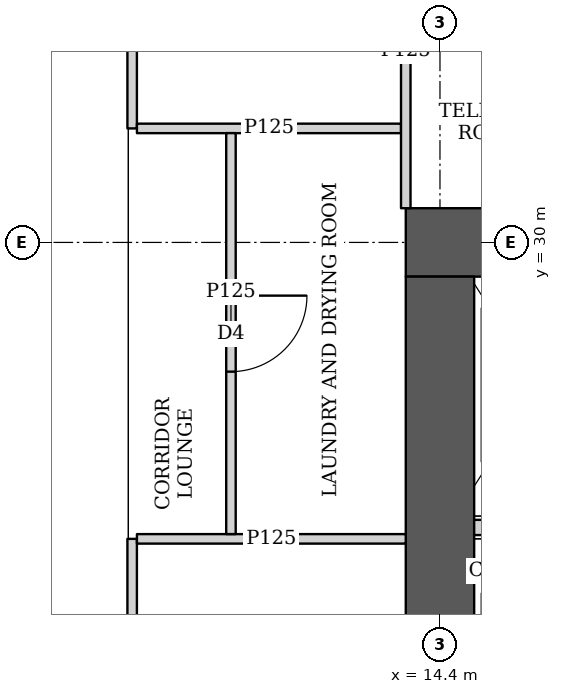
"""IFC4 building model, lengths in metres.
Left out: names, types, materials, properties, quantities, classifications, styles, units other than length and angle.
Written with IfcOpenShell. Run it as: python <this file> out.ifc"""

import sys

from ifc_helpers import new_model, si_unit, direction, frame, frame_2d, origin, place, context, subcontext, project, spatial, rectangle, extrude, element, fill, save


model = new_model("IFC4")
c1 = context("Model", 3, precision=1e-05, world=origin(), true_north=direction((0.0, 1.0)))
c2 = subcontext(c1, "Body", "Model", "MODEL_VIEW")
j1 = project(units=[si_unit("LENGTHUNIT", "METRE"), si_unit("PLANEANGLEUNIT", "RADIAN")], contexts=[c1])
p1 = place(None, origin())
s1 = spatial("IfcSite", under=j1, at=p1, CompositionType="ELEMENT")
p2 = place(p1, origin())
s2 = spatial("IfcBuilding", under=s1, at=p2, CompositionType="ELEMENT")
p3 = place(p2, frame((0.0, 0.0, 20.0)))
s3 = spatial("IfcBuildingStorey", under=s2, at=p3, CompositionType="ELEMENT", Elevation=20.0)
p4 = place(p3, frame((13.95, 30.0, 0.0), z_axis=(0.0, 0.0, 1.0), x_axis=(1.0, 0.0, 0.0)))
e1 = element("IfcWall", 1, at=p4, inside=s3, PredefinedType="SHEAR", context=c2, shape_type="SweptSolid", body=[
    extrude(rectangle(XDim=15.3, YDim=0.9, at=frame_2d((7.65, 0.0))), origin(), (0.0, 0.0, 1.0), 3.75),
])
p5 = place(p4, frame((4.45, 0.0, 0.0)))
e2 = element("IfcOpeningElement", 2, at=p5, cuts=e1, PredefinedType="OPENING", context=c2, shape_type="SweptSolid", body=[
    extrude(rectangle(XDim=1.8, YDim=2.1, at=frame_2d((0.9, 1.05))), frame((0.0, 0.46, 0.0), z_axis=(0.0, -1.0, 0.0), x_axis=(1.0, 0.0, 0.0)), (0.0, 0.0, 1.0), 0.92),
])
p6 = place(p4, frame((10.7, 0.0, 0.0)))
e3 = element("IfcOpeningElement", 3, at=p6, cuts=e1, PredefinedType="OPENING", context=c2, shape_type="SweptSolid", body=[
    extrude(rectangle(XDim=1.1, YDim=2.1, at=frame_2d((0.55, 1.05))), frame((0.0, 0.46, 0.0), z_axis=(0.0, -1.0, 0.0), x_axis=(1.0, 0.0, 0.0)), (0.0, 0.0, 1.0), 0.92),
])
p7 = place(p3, frame((14.4, 15.45, 0.0), z_axis=(0.0, 0.0, 1.0), x_axis=(0.0, 1.0, 0.0)))
e4 = element("IfcWall", 4, at=p7, inside=s3, PredefinedType="SHEAR", context=c2, shape_type="SweptSolid", body=[
    extrude(rectangle(XDim=14.1, YDim=0.9, at=frame_2d((7.05, 0.0))), origin(), (0.0, 0.0, 1.0), 3.75),
])
p8 = place(p3, frame((10.35, 10.3, 0.0), z_axis=(0.0, 0.0, 1.0), x_axis=(0.0, 1.0, 0.0)))
e5 = element("IfcWall", 5, at=p8, inside=s3, PredefinedType="PARTITIONING", context=c2, shape_type="SweptSolid", body=[
    extrude(rectangle(XDim=15.8, YDim=0.125, at=frame_2d((7.9, 0.0))), origin(), (0.0, 0.0, 1.0), 3.5),
])
p9 = place(p8, frame((1.55, 0.0, 0.0)))
e6 = element("IfcOpeningElement", 6, at=p9, cuts=e5, PredefinedType="OPENING", context=c2, shape_type="SweptSolid", body=[
    extrude(rectangle(XDim=1.0, YDim=2.1, at=frame_2d((0.5, 1.05))), frame((0.0, 0.073, 0.0), z_axis=(0.0, -1.0, 0.0), x_axis=(1.0, 0.0, 0.0)), (0.0, 0.0, 1.0), 0.145),
])
p10 = place(p8, frame((5.7, 0.0, 0.0)))
e7 = element("IfcOpeningElement", 7, at=p10, cuts=e5, PredefinedType="OPENING", context=c2, shape_type="SweptSolid", body=[
    extrude(rectangle(XDim=1.0, YDim=2.1, at=frame_2d((0.5, 1.05))), frame((0.0, 0.073, 0.0), z_axis=(0.0, -1.0, 0.0), x_axis=(1.0, 0.0, 0.0)), (0.0, 0.0, 1.0), 0.145),
])
p11 = place(p8, frame((11.55, 0.0, 0.0)))
e8 = element("IfcOpeningElement", 8, at=p11, cuts=e5, PredefinedType="OPENING", context=c2, shape_type="SweptSolid", body=[
    extrude(rectangle(XDim=1.0, YDim=2.1, at=frame_2d((0.5, 1.05))), frame((0.0, 0.073, 0.0), z_axis=(0.0, -1.0, 0.0), x_axis=(1.0, 0.0, 0.0)), (0.0, 0.0, 1.0), 0.145),
])
p12 = place(p3, frame((10.35, 31.5, 0.0), z_axis=(0.0, 0.0, 1.0), x_axis=(0.0, 1.0, 0.0)))
e9 = element("IfcWall", 9, at=p12, inside=s3, PredefinedType="PARTITIONING", context=c2, shape_type="SweptSolid", body=[
    extrude(rectangle(XDim=3.2, YDim=0.125, at=frame_2d((1.6, 0.0))), origin(), (0.0, 0.0, 1.0), 3.5),
])
p13 = place(p12, frame((1.1, 0.0, 0.0)))
e10 = element("IfcOpeningElement", 10, at=p13, cuts=e9, PredefinedType="OPENING", context=c2, shape_type="SweptSolid", body=[
    extrude(rectangle(XDim=1.0, YDim=2.1, at=frame_2d((0.5, 1.05))), frame((0.0, 0.073, 0.0), z_axis=(0.0, -1.0, 0.0), x_axis=(1.0, 0.0, 0.0)), (0.0, 0.0, 1.0), 0.145),
])
p14 = place(p3, frame((11.65, 26.163, 0.0), z_axis=(0.0, 0.0, 1.0), x_axis=(0.0, 1.0, 0.0)))
e11 = element("IfcWall", 11, at=p14, inside=s3, PredefinedType="PARTITIONING", context=c2, shape_type="SweptSolid", body=[
    extrude(rectangle(XDim=5.275, YDim=0.125, at=frame_2d((2.637, 0.0))), origin(), (0.0, 0.0, 1.0), 3.5),
])
p15 = place(p14, frame((2.137, 0.0, 0.0)))
e12 = element("IfcOpeningElement", 12, at=p15, cuts=e11, PredefinedType="OPENING", context=c2, shape_type="SweptSolid", body=[
    extrude(rectangle(XDim=1.0, YDim=2.1, at=frame_2d((0.5, 1.05))), frame((0.0, 0.073, 0.0), z_axis=(0.0, -1.0, 0.0), x_axis=(1.0, 0.0, 0.0)), (0.0, 0.0, 1.0), 0.145),
])
p16 = place(p3, frame((10.413, 26.1, 0.0), z_axis=(0.0, 0.0, 1.0), x_axis=(1.0, 0.0, 0.0)))
e13 = element("IfcWall", 13, at=p16, inside=s3, PredefinedType="PARTITIONING", context=c2, shape_type="SweptSolid", body=[
    extrude(rectangle(XDim=3.537, YDim=0.125, at=frame_2d((1.769, 0.0))), origin(), (0.0, 0.0, 1.0), 3.5),
])
p17 = place(p3, frame((10.413, 31.5, 0.0), z_axis=(0.0, 0.0, 1.0), x_axis=(1.0, 0.0, 0.0)))
e14 = element("IfcWall", 14, at=p17, inside=s3, PredefinedType="PARTITIONING", context=c2, shape_type="SweptSolid", body=[
    extrude(rectangle(XDim=3.475, YDim=0.125, at=frame_2d((1.737, 0.0))), origin(), (0.0, 0.0, 1.0), 3.5),
])
p18 = place(p3, frame((13.95, 30.45, 0.0), z_axis=(0.0, 0.0, 1.0), x_axis=(0.0, 1.0, 0.0)))
e15 = element("IfcWall", 15, at=p18, inside=s3, PredefinedType="PARTITIONING", context=c2, shape_type="SweptSolid", body=[
    extrude(rectangle(XDim=4.137, YDim=0.125, at=frame_2d((2.068, 0.0))), origin(), (0.0, 0.0, 1.0), 3.5),
])
p19 = place(p3, frame((14.85, 26.25, 0.0), z_axis=(0.0, 0.0, 1.0), x_axis=(1.0, 0.0, 0.0)))
e16 = element("IfcWall", 16, at=p19, inside=s3, PredefinedType="SOLIDWALL", context=c2, shape_type="SweptSolid", body=[
    extrude(rectangle(XDim=1.95, YDim=0.2, at=frame_2d((0.975, 0.0))), origin(), (0.0, 0.0, 1.0), 3.5),
])
p20 = place(p15, origin())
e17 = element("IfcDoor", 17, at=p20, inside=s3, OperationType="SINGLE_SWING_LEFT", PredefinedType="DOOR", context=c2, shape_type="SweptSolid", body=[
    extrude(rectangle(XDim=1.0, YDim=2.1, at=frame_2d((0.5, 1.05))), frame((0.0, 0.025, 0.0), z_axis=(0.0, -1.0, 0.0), x_axis=(1.0, 0.0, 0.0)), (0.0, 0.0, 1.0), 0.05),
])
fill(e12, e17)
save(model, sys.argv[1])
